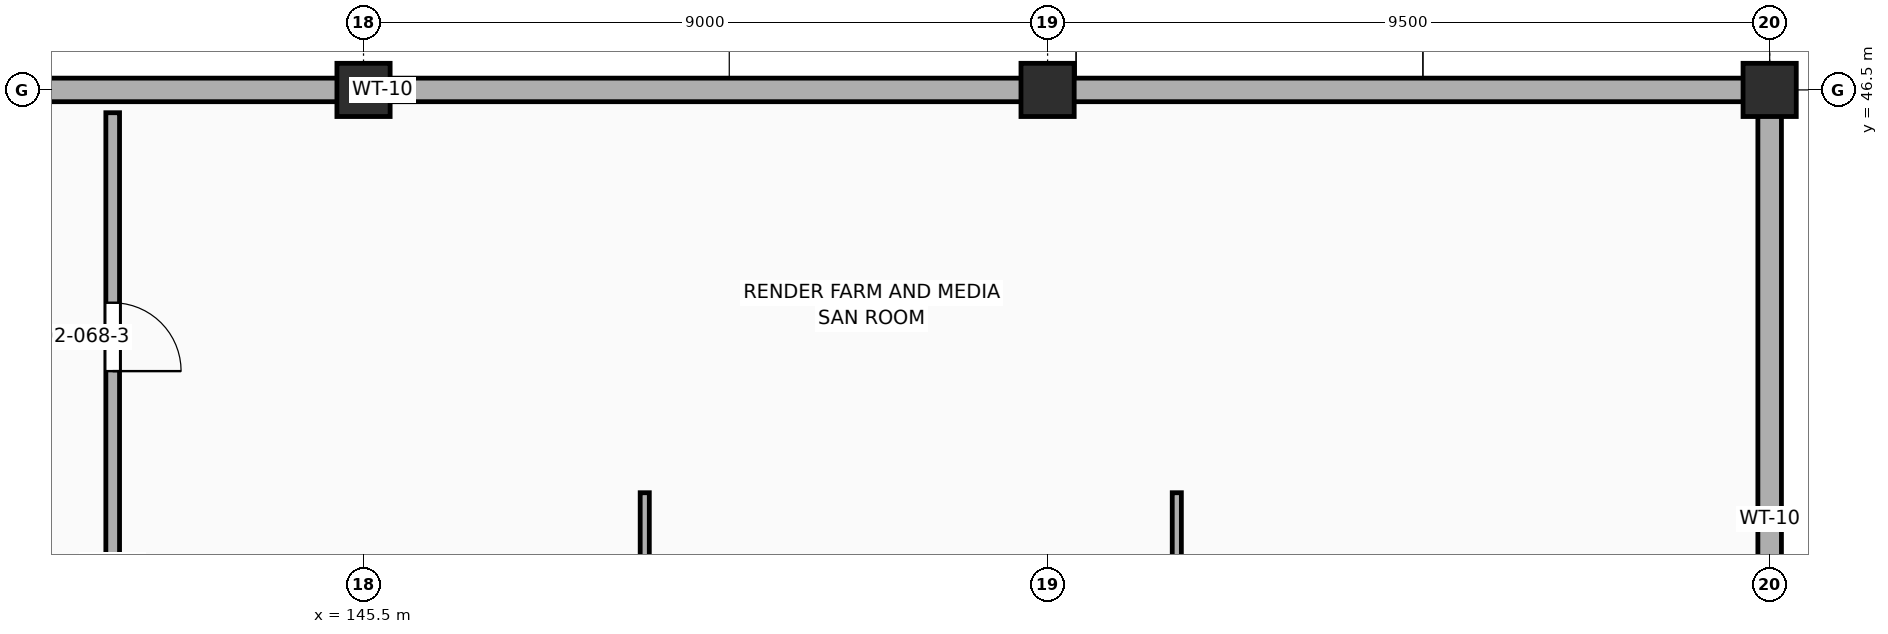
"""IFC4 building model, lengths in metres.
Left out: names, types, materials, properties, quantities, classifications, styles, units other than length and angle.
Written with IfcOpenShell. Run it as: python <this file> out.ifc"""

import sys

from ifc_helpers import new_model, si_unit, direction, frame, frame_2d, origin, origin_2d, place, context, subcontext, project, spatial, rectangle, extrude, element, fill, save


model = new_model("IFC4")
c1 = context("Model", 3, precision=1e-05, world=origin(), true_north=direction((0.0, 1.0)))
c2 = subcontext(c1, "Body", "Model", "MODEL_VIEW")
j1 = project(units=[si_unit("LENGTHUNIT", "METRE"), si_unit("PLANEANGLEUNIT", "RADIAN")], contexts=[c1])
p1 = place(None, origin())
s1 = spatial("IfcSite", under=j1, at=p1, CompositionType="ELEMENT")
p2 = place(p1, origin())
s2 = spatial("IfcBuilding", under=s1, at=p2, CompositionType="ELEMENT")
p3 = place(p2, frame((0.0, 0.0, 10.2)))
s3 = spatial("IfcBuildingStorey", under=s2, at=p3, CompositionType="ELEMENT", Elevation=10.2)
for number, where, z_axis, x_axis in (
    (1, (145.5, 46.5, 0.0), (0.0, 0.0, 1.0), (1.0, 0.0, 0.0)),
    (2, (154.5, 46.5, 0.0), (0.0, 0.0, 1.0), (1.0, 0.0, 0.0)),
    (3, (164.0, 46.5, 0.0), (0.0, 0.0, 1.0), (1.0, 0.0, 0.0)),
):
    element("IfcColumn", number, at=place(p3, frame(where, z_axis=z_axis, x_axis=x_axis)), inside=s3, PredefinedType="COLUMN", context=c2, shape_type="SweptSolid", body=[
        extrude(rectangle(XDim=0.7, YDim=0.7, at=origin_2d()), origin(), (0.0, 0.0, 1.0), 4.54),
    ])
p4 = place(p3, frame((164.0, 0.0, 0.0), z_axis=(0.0, 0.0, 1.0), x_axis=(0.0, 1.0, 0.0)))
e4 = element("IfcWall", 4, at=p4, inside=s3, PredefinedType="STANDARD", context=c2, shape_type="SweptSolid", body=[
    extrude(rectangle(XDim=46.5, YDim=0.31, at=frame_2d((23.25, 0.0))), origin(), (0.0, 0.0, 1.0), 4.118),
])
p5 = place(p4, frame((3.85, 0.0, 1.0)))
e5 = element("IfcOpeningElement", 5, at=p5, cuts=e4, PredefinedType="OPENING", context=c2, shape_type="SweptSolid", body=[
    extrude(rectangle(XDim=1.6, YDim=2.2, at=frame_2d((0.8, 1.1))), frame((0.0, 0.167, 0.0), z_axis=(0.0, -1.0, 0.0), x_axis=(1.0, 0.0, 0.0)), (0.0, 0.0, 1.0), 0.334),
])
p6 = place(p4, frame((13.15, 0.0, 1.0)))
e6 = element("IfcOpeningElement", 6, at=p6, cuts=e4, PredefinedType="OPENING", context=c2, shape_type="SweptSolid", body=[
    extrude(rectangle(XDim=1.6, YDim=2.2, at=frame_2d((0.8, 1.1))), frame((0.0, 0.167, 0.0), z_axis=(0.0, -1.0, 0.0), x_axis=(1.0, 0.0, 0.0)), (0.0, 0.0, 1.0), 0.334),
])
p7 = place(p4, frame((22.45, 0.0, 1.0)))
e7 = element("IfcOpeningElement", 7, at=p7, cuts=e4, PredefinedType="OPENING", context=c2, shape_type="SweptSolid", body=[
    extrude(rectangle(XDim=1.6, YDim=2.2, at=frame_2d((0.8, 1.1))), frame((0.0, 0.167, 0.0), z_axis=(0.0, -1.0, 0.0), x_axis=(1.0, 0.0, 0.0)), (0.0, 0.0, 1.0), 0.334),
])
p8 = place(p4, frame((31.75, 0.0, 1.0)))
e8 = element("IfcOpeningElement", 8, at=p8, cuts=e4, PredefinedType="OPENING", context=c2, shape_type="SweptSolid", body=[
    extrude(rectangle(XDim=1.6, YDim=2.2, at=frame_2d((0.8, 1.1))), frame((0.0, 0.167, 0.0), z_axis=(0.0, -1.0, 0.0), x_axis=(1.0, 0.0, 0.0)), (0.0, 0.0, 1.0), 0.334),
])
p9 = place(p3, frame((127.5, 46.5, 0.0), z_axis=(0.0, 0.0, 1.0), x_axis=(1.0, 0.0, 0.0)))
e9 = element("IfcWall", 9, at=p9, inside=s3, PredefinedType="STANDARD", context=c2, shape_type="SweptSolid", body=[
    extrude(rectangle(XDim=36.5, YDim=0.31, at=frame_2d((18.25, 0.0))), origin(), (0.0, 0.0, 1.0), 3.7),
])
p10 = place(p3, frame((142.2, 20.3, 0.0), z_axis=(0.0, 0.0, 1.0), x_axis=(0.0, 1.0, 0.0)))
e10 = element("IfcWall", 10, at=p10, inside=s3, PredefinedType="PARTITIONING", context=c2, shape_type="SweptSolid", body=[
    extrude(rectangle(XDim=25.9, YDim=0.18, at=frame_2d((12.95, 0.0))), origin(), (0.0, 0.0, 1.0), 3.85),
])
p11 = place(p10, frame((6.0, 0.0, 0.0)))
e11 = element("IfcOpeningElement", 11, at=p11, cuts=e10, PredefinedType="OPENING", context=c2, shape_type="SweptSolid", body=[
    extrude(rectangle(XDim=1.0, YDim=2.15, at=frame_2d((0.5, 1.075))), frame((0.0, 0.102, 0.0), z_axis=(0.0, -1.0, 0.0), x_axis=(1.0, 0.0, 0.0)), (0.0, 0.0, 1.0), 0.204),
])
p12 = place(p10, frame((16.5, 0.0, 0.0)))
e12 = element("IfcOpeningElement", 12, at=p12, cuts=e10, PredefinedType="OPENING", context=c2, shape_type="SweptSolid", body=[
    extrude(rectangle(XDim=0.9, YDim=2.15, at=frame_2d((0.45, 1.075))), frame((0.0, 0.102, 0.0), z_axis=(0.0, -1.0, 0.0), x_axis=(1.0, 0.0, 0.0)), (0.0, 0.0, 1.0), 0.204),
])
p13 = place(p10, frame((22.5, 0.0, 0.0)))
e13 = element("IfcOpeningElement", 13, at=p13, cuts=e10, PredefinedType="OPENING", context=c2, shape_type="SweptSolid", body=[
    extrude(rectangle(XDim=0.9, YDim=2.1, at=frame_2d((0.45, 1.05))), frame((0.0, 0.102, 0.0), z_axis=(0.0, -1.0, 0.0), x_axis=(1.0, 0.0, 0.0)), (0.0, 0.0, 1.0), 0.204),
])
p14 = place(p3, frame((149.2, 35.3, 0.0), z_axis=(0.0, 0.0, 1.0), x_axis=(0.0, 1.0, 0.0)))
e14 = element("IfcWall", 14, at=p14, inside=s3, PredefinedType="PARTITIONING", context=c2, shape_type="SweptSolid", body=[
    extrude(rectangle(XDim=5.9, YDim=0.12, at=frame_2d((2.95, 0.0))), origin(), (0.0, 0.0, 1.0), 3.7),
])
p15 = place(p14, frame((2.0, 0.0, 0.0)))
e15 = element("IfcOpeningElement", 15, at=p15, cuts=e14, PredefinedType="OPENING", context=c2, shape_type="SweptSolid", body=[
    extrude(rectangle(XDim=0.9, YDim=2.15, at=frame_2d((0.45, 1.075))), frame((0.0, 0.072, 0.0), z_axis=(0.0, -1.0, 0.0), x_axis=(1.0, 0.0, 0.0)), (0.0, 0.0, 1.0), 0.144),
])
p16 = place(p3, frame((156.2, 35.3, 0.0), z_axis=(0.0, 0.0, 1.0), x_axis=(0.0, 1.0, 0.0)))
e16 = element("IfcWall", 16, at=p16, inside=s3, PredefinedType="PARTITIONING", context=c2, shape_type="SweptSolid", body=[
    extrude(rectangle(XDim=5.9, YDim=0.12, at=frame_2d((2.95, 0.0))), origin(), (0.0, 0.0, 1.0), 4.148),
])
p17 = place(p16, frame((2.0, 0.0, 0.0)))
e17 = element("IfcOpeningElement", 17, at=p17, cuts=e16, PredefinedType="OPENING", context=c2, shape_type="SweptSolid", body=[
    extrude(rectangle(XDim=0.95, YDim=2.15, at=frame_2d((0.475, 1.075))), frame((0.0, 0.072, 0.0), z_axis=(0.0, -1.0, 0.0), x_axis=(1.0, 0.0, 0.0)), (0.0, 0.0, 1.0), 0.144),
])
p18 = place(p13, frame((0.9, 0.0, 0.0), z_axis=(0.0, 0.0, 1.0), x_axis=(-1.0, 0.0, 0.0)))
e18 = element("IfcDoor", 18, at=p18, inside=s3, OperationType="SINGLE_SWING_LEFT", PredefinedType="DOOR", context=c2, shape_type="SweptSolid", body=[
    extrude(rectangle(XDim=0.9, YDim=2.1, at=frame_2d((0.45, 1.05))), frame((0.0, 0.025, 0.0), z_axis=(0.0, -1.0, 0.0), x_axis=(1.0, 0.0, 0.0)), (0.0, 0.0, 1.0), 0.05),
])
fill(e13, e18)
save(model, sys.argv[1])
